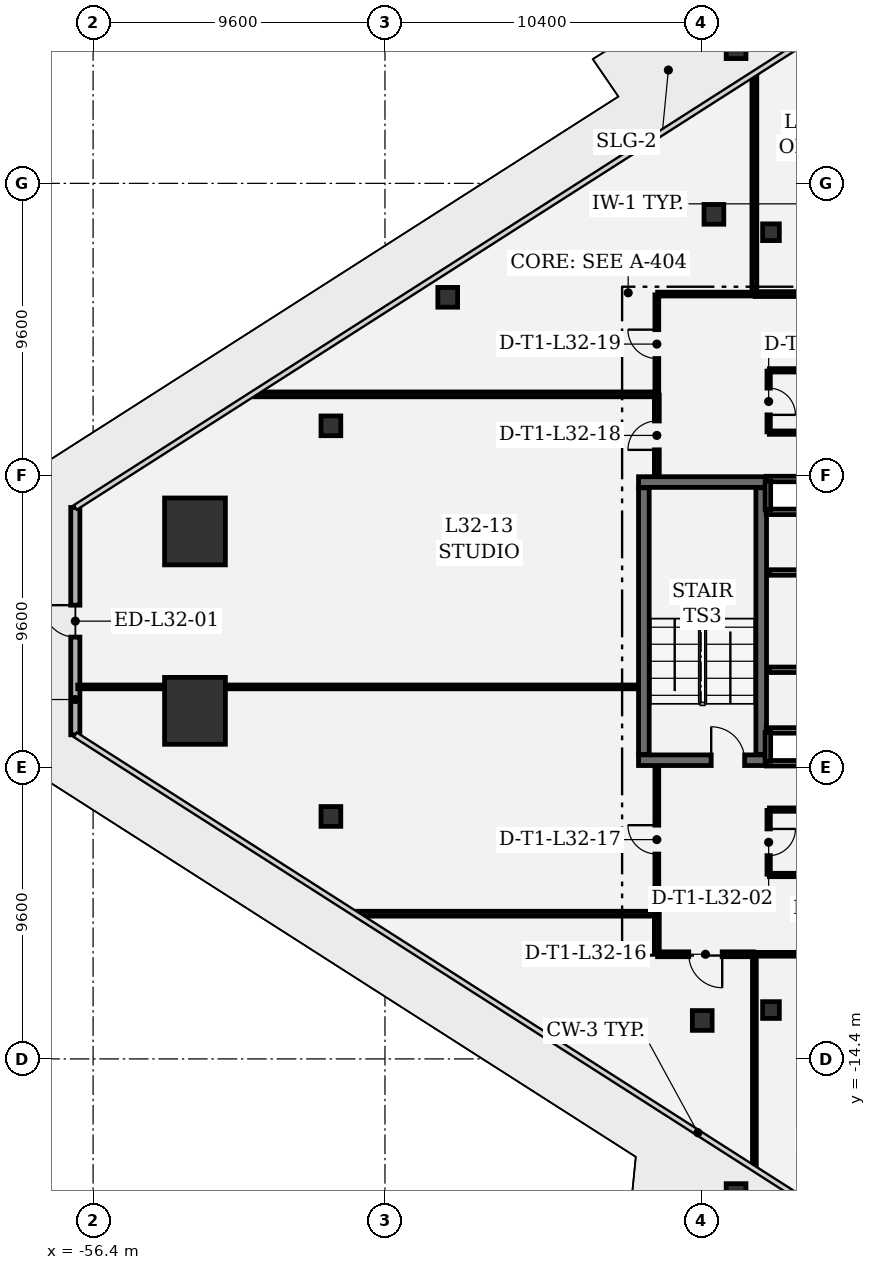
"""IFC4 building model, lengths in metres.
Left out: names, types, materials, properties, quantities, classifications, styles, units other than length and angle.
Written with IfcOpenShell. Run it as: python <this file> out.ifc"""

import sys

from ifc_helpers import new_model, si_unit, direction, frame, frame_2d, origin, origin_2d, place, context, subcontext, project, spatial, rectangle, extrude, element, fill, save


model = new_model("IFC4")
c1 = context("Model", 3, precision=1e-05, world=origin(), true_north=direction((0.0, 1.0)))
c2 = subcontext(c1, "Body", "Model", "MODEL_VIEW")
j1 = project(units=[si_unit("LENGTHUNIT", "METRE"), si_unit("PLANEANGLEUNIT", "RADIAN")], contexts=[c1])
p1 = place(None, origin())
s1 = spatial("IfcSite", under=j1, at=p1, CompositionType="ELEMENT")
p2 = place(p1, origin())
s2 = spatial("IfcBuilding", under=s1, at=p2, CompositionType="ELEMENT")
p3 = place(p2, frame((0.0, 0.0, 142.2)))
s3 = spatial("IfcBuildingStorey", under=s2, at=p3, CompositionType="ELEMENT", Elevation=142.2)
for number, where, z_axis, x_axis in (
    (1, (-53.049, 2.951, 0.0), (0.0, 0.0, 1.0), (1.0, 0.0, 0.0)),
    (2, (-53.049, -2.951, 0.0), (0.0, 0.0, 1.0), (1.0, 0.0, 0.0)),
):
    element("IfcColumn", number, at=place(p3, frame(where, z_axis=z_axis, x_axis=x_axis)), inside=s3, PredefinedType="COLUMN", context=c2, shape_type="SweptSolid", body=[
        extrude(rectangle(XDim=2.0, YDim=2.2, at=origin_2d()), origin(), (0.0, 0.0, 1.0), 4.05),
    ])
for number, where, z_axis, x_axis in (
    (3, (-35.252, 18.829, 0.0), (0.0, 0.0, 1.0), (1.0, 0.0, 0.0)),
    (4, (-35.252, -18.829, 0.0), (0.0, 0.0, 1.0), (1.0, 0.0, 0.0)),
    (5, (-44.736, 10.652, 0.0), (0.0, 0.0, 1.0), (1.0, 0.0, 0.0)),
    (6, (-48.578, 6.425, 0.0), (0.0, 0.0, 1.0), (1.0, 0.0, 0.0)),
    (7, (-48.578, -6.425, 0.0), (0.0, 0.0, 1.0), (1.0, 0.0, 0.0)),
    (8, (-35.981, 13.381, 0.0), (0.0, 0.0, 1.0), (1.0, 0.0, 0.0)),
    (9, (-36.365, -13.135, 0.0), (0.0, 0.0, 1.0), (1.0, 0.0, 0.0)),
):
    element("IfcColumn", number, at=place(p3, frame(where, z_axis=z_axis, x_axis=x_axis)), inside=s3, PredefinedType="COLUMN", context=c2, shape_type="SweptSolid", body=[
        extrude(rectangle(XDim=0.65, YDim=0.65, at=origin_2d()), origin(), (0.0, 0.0, 1.0), 4.05),
    ])
for number, where, z_axis, x_axis in (
    (10, (-34.104, 12.792, 0.0), (0.0, 0.0, 1.0), (1.0, 0.0, 0.0)),
    (11, (-34.104, -12.792, 0.0), (0.0, 0.0, 1.0), (1.0, 0.0, 0.0)),
):
    element("IfcColumn", number, at=place(p3, frame(where, z_axis=z_axis, x_axis=x_axis)), inside=s3, PredefinedType="COLUMN", context=c2, shape_type="SweptSolid", body=[
        extrude(rectangle(XDim=0.55, YDim=0.55, at=origin_2d()), origin(), (0.0, 0.0, 1.0), 4.05),
    ])
p4 = place(p3, frame((-56.985, -3.74, 0.0), z_axis=(0.0, 0.0, 1.0), x_axis=(0.0, 1.0, 0.0)))
e12 = element("IfcWall", 12, at=p4, inside=s3, PredefinedType="SOLIDWALL", context=c2, shape_type="SweptSolid", body=[
    extrude(rectangle(XDim=7.479, YDim=0.3, at=frame_2d((3.74, 0.0))), origin(), (0.0, 0.0, 1.0), 3.78),
])
p5 = place(p4, frame((3.215, 0.0, 0.0)))
e13 = element("IfcOpeningElement", 13, at=p5, cuts=e12, PredefinedType="OPENING", context=c2, shape_type="SweptSolid", body=[
    extrude(rectangle(XDim=1.05, YDim=2.2, at=frame_2d((0.525, 1.1))), frame((0.0, 0.16, 0.0), z_axis=(0.0, -1.0, 0.0), x_axis=(1.0, 0.0, 0.0)), (0.0, 0.0, 1.0), 0.32),
])
p6 = place(p3, frame((-38.46, -4.575, 0.0), z_axis=(0.0, 0.0, 1.0), x_axis=(1.0, 0.0, 0.0)))
e14 = element("IfcWall", 14, at=p6, inside=s3, PredefinedType="SHEAR", context=c2, shape_type="SweptSolid", body=[
    extrude(rectangle(XDim=4.21, YDim=0.35, at=frame_2d((2.105, 0.0))), origin(), (0.0, 0.0, 1.0), 3.78),
])
p7 = place(p6, frame((2.39, 0.0, 0.0)))
e15 = element("IfcOpeningElement", 15, at=p7, cuts=e14, PredefinedType="OPENING", context=c2, shape_type="SweptSolid", body=[
    extrude(rectangle(XDim=1.1, YDim=2.2, at=frame_2d((0.55, 1.1))), frame((0.0, 0.185, 0.0), z_axis=(0.0, -1.0, 0.0), x_axis=(1.0, 0.0, 0.0)), (0.0, 0.0, 1.0), 0.37),
])
p8 = place(p3, frame((-34.25, 4.575, 0.0), z_axis=(0.0, 0.0, 1.0), x_axis=(-1.0, 0.0, 0.0)))
e16 = element("IfcWall", 16, at=p8, inside=s3, PredefinedType="SHEAR", context=c2, shape_type="SweptSolid", body=[
    extrude(rectangle(XDim=4.21, YDim=0.35, at=frame_2d((2.105, 0.0))), origin(), (0.0, 0.0, 1.0), 3.78),
])
for number, where, z_axis, x_axis in (
    (17, (-34.425, -4.385, 0.0), (0.0, 0.0, 1.0), (0.0, 1.0, 0.0)),
    (18, (-38.285, 4.385, 0.0), (0.0, 0.0, 1.0), (0.0, -1.0, 0.0)),
):
    element("IfcWall", number, at=place(p3, frame(where, z_axis=z_axis, x_axis=x_axis)), inside=s3, PredefinedType="SHEAR", context=c2, shape_type="SweptSolid", body=[
        extrude(rectangle(XDim=8.77, YDim=0.35, at=frame_2d((4.385, 0.0))), origin(), (0.0, 0.0, 1.0), 3.78),
    ])
for number, where, z_axis, x_axis in (
    (19, (-32.99, 3.595, 0.0), (0.0, 0.0, 1.0), (-1.0, 0.0, 0.0)),
    (20, (-34.26, 4.675, 0.0), (0.0, 0.0, 1.0), (1.0, 0.0, 0.0)),
):
    element("IfcWall", number, at=place(p3, frame(where, z_axis=z_axis, x_axis=x_axis)), inside=s3, PredefinedType="PARTITIONING", context=c2, shape_type="SweptSolid", body=[
        extrude(rectangle(XDim=1.27, YDim=0.18, at=frame_2d((0.635, 0.0))), origin(), (0.0, 0.0, 1.0), 3.78),
    ])
p9 = place(p3, frame((-34.205, 3.66, 0.0), z_axis=(0.0, 0.0, 1.0), x_axis=(0.0, 1.0, 0.0)))
e21 = element("IfcWall", 21, at=p9, inside=s3, PredefinedType="PARTITIONING", context=c2, shape_type="SweptSolid", body=[
    extrude(rectangle(XDim=0.95, YDim=0.18, at=frame_2d((0.475, 0.0))), origin(), (0.0, 0.0, 1.0), 3.78),
])
for number, where, z_axis, x_axis in (
    (22, (-32.99, -4.675, 0.0), (0.0, 0.0, 1.0), (-1.0, 0.0, 0.0)),
    (23, (-34.26, -3.595, 0.0), (0.0, 0.0, 1.0), (1.0, 0.0, 0.0)),
):
    element("IfcWall", number, at=place(p3, frame(where, z_axis=z_axis, x_axis=x_axis)), inside=s3, PredefinedType="PARTITIONING", context=c2, shape_type="SweptSolid", body=[
        extrude(rectangle(XDim=1.27, YDim=0.18, at=frame_2d((0.635, 0.0))), origin(), (0.0, 0.0, 1.0), 3.78),
    ])
p10 = place(p3, frame((-34.205, -4.61, 0.0), z_axis=(0.0, 0.0, 1.0), x_axis=(0.0, 1.0, 0.0)))
e24 = element("IfcWall", 24, at=p10, inside=s3, PredefinedType="PARTITIONING", context=c2, shape_type="SweptSolid", body=[
    extrude(rectangle(XDim=0.95, YDim=0.18, at=frame_2d((0.475, 0.0))), origin(), (0.0, 0.0, 1.0), 3.78),
])
p11 = place(p3, frame((-34.18, 8.225, 0.0), z_axis=(0.0, 0.0, 1.0), x_axis=(0.0, -1.0, 0.0)))
e25 = element("IfcWall", 25, at=p11, inside=s3, PredefinedType="PARTITIONING", context=c2, shape_type="SweptSolid", body=[
    extrude(rectangle(XDim=2.0, YDim=0.11, at=frame_2d((1.0, 0.0))), origin(), (0.0, 0.0, 1.0), 3.78),
])
p12 = place(p11, frame((0.56, 0.0, 0.0)))
e26 = element("IfcOpeningElement", 26, at=p12, cuts=e25, PredefinedType="OPENING", context=c2, shape_type="SweptSolid", body=[
    extrude(rectangle(XDim=0.88, YDim=2.1, at=frame_2d((0.44, 1.05))), frame((0.0, 0.065, 0.0), z_axis=(0.0, -1.0, 0.0), x_axis=(1.0, 0.0, 0.0)), (0.0, 0.0, 1.0), 0.13),
])
p13 = place(p3, frame((-34.155, 6.2, 0.0), z_axis=(0.0, 0.0, 1.0), x_axis=(1.0, 0.0, 0.0)))
e27 = element("IfcWall", 27, at=p13, inside=s3, PredefinedType="PARTITIONING", context=c2, shape_type="SweptSolid", body=[
    extrude(rectangle(XDim=3.25, YDim=0.11, at=frame_2d((1.625, 0.0))), origin(), (0.0, 0.0, 1.0), 3.344),
])
p14 = place(p3, frame((-30.905, 8.25, 0.0), z_axis=(0.0, 0.0, 1.0), x_axis=(-1.0, 0.0, 0.0)))
e28 = element("IfcWall", 28, at=p14, inside=s3, PredefinedType="PARTITIONING", context=c2, shape_type="SweptSolid", body=[
    extrude(rectangle(XDim=3.25, YDim=0.11, at=frame_2d((1.625, 0.0))), origin(), (0.0, 0.0, 1.0), 3.78),
])
p15 = place(p3, frame((-34.18, -6.225, 0.0), z_axis=(0.0, 0.0, 1.0), x_axis=(0.0, -1.0, 0.0)))
e29 = element("IfcWall", 29, at=p15, inside=s3, PredefinedType="PARTITIONING", context=c2, shape_type="SweptSolid", body=[
    extrude(rectangle(XDim=2.1, YDim=0.11, at=frame_2d((1.05, 0.0))), origin(), (0.0, 0.0, 1.0), 3.78),
])
p16 = place(p15, frame((0.61, 0.0, 0.0)))
e30 = element("IfcOpeningElement", 30, at=p16, cuts=e29, PredefinedType="OPENING", context=c2, shape_type="SweptSolid", body=[
    extrude(rectangle(XDim=0.88, YDim=2.1, at=frame_2d((0.44, 1.05))), frame((0.0, 0.065, 0.0), z_axis=(0.0, -1.0, 0.0), x_axis=(1.0, 0.0, 0.0)), (0.0, 0.0, 1.0), 0.13),
])
p17 = place(p3, frame((-34.155, -8.35, 0.0), z_axis=(0.0, 0.0, 1.0), x_axis=(1.0, 0.0, 0.0)))
e31 = element("IfcWall", 31, at=p17, inside=s3, PredefinedType="PARTITIONING", context=c2, shape_type="SweptSolid", body=[
    extrude(rectangle(XDim=3.25, YDim=0.11, at=frame_2d((1.625, 0.0))), origin(), (0.0, 0.0, 1.0), 3.78),
])
p18 = place(p3, frame((-30.905, -6.2, 0.0), z_axis=(0.0, 0.0, 1.0), x_axis=(-1.0, 0.0, 0.0)))
e32 = element("IfcWall", 32, at=p18, inside=s3, PredefinedType="PARTITIONING", context=c2, shape_type="SweptSolid", body=[
    extrude(rectangle(XDim=3.25, YDim=0.11, at=frame_2d((1.625, 0.0))), origin(), (0.0, 0.0, 1.0), 3.344),
])
p19 = place(p3, frame((-34.155, 1.6, 0.0), z_axis=(0.0, 0.0, 1.0), x_axis=(1.0, 0.0, 0.0)))
e33 = element("IfcWall", 33, at=p19, inside=s3, PredefinedType="PARTITIONING", context=c2, shape_type="SweptSolid", body=[
    extrude(rectangle(XDim=3.25, YDim=0.18, at=frame_2d((1.625, 0.0))), origin(), (0.0, 0.0, 1.0), 3.78),
])
p20 = place(p19, frame((1.185, 0.0, 0.0)))
e34 = element("IfcOpeningElement", 34, at=p20, cuts=e33, PredefinedType="OPENING", context=c2, shape_type="SweptSolid", body=[
    extrude(rectangle(XDim=0.88, YDim=2.1, at=frame_2d((0.44, 1.05))), frame((0.0, 0.1, 0.0), z_axis=(0.0, -1.0, 0.0), x_axis=(1.0, 0.0, 0.0)), (0.0, 0.0, 1.0), 0.2),
])
p21 = place(p3, frame((-30.905, -1.6, 0.0), z_axis=(0.0, 0.0, 1.0), x_axis=(-1.0, 0.0, 0.0)))
e35 = element("IfcWall", 35, at=p21, inside=s3, PredefinedType="PARTITIONING", context=c2, shape_type="SweptSolid", body=[
    extrude(rectangle(XDim=3.25, YDim=0.18, at=frame_2d((1.625, 0.0))), origin(), (0.0, 0.0, 1.0), 3.78),
])
p22 = place(p21, frame((1.185, 0.0, 0.0)))
e36 = element("IfcOpeningElement", 36, at=p22, cuts=e35, PredefinedType="OPENING", context=c2, shape_type="SweptSolid", body=[
    extrude(rectangle(XDim=0.88, YDim=2.1, at=frame_2d((0.44, 1.05))), frame((0.0, 0.1, 0.0), z_axis=(0.0, -1.0, 0.0), x_axis=(1.0, 0.0, 0.0)), (0.0, 0.0, 1.0), 0.2),
])
p23 = place(p3, frame((-34.625, 10.758, 0.0), z_axis=(0.0, 0.0, 1.0), x_axis=(1.0, 0.0, 0.0)))
e37 = element("IfcWall", 37, at=p23, inside=s3, PredefinedType="PARTITIONING", context=c2, shape_type="SweptSolid", body=[
    extrude(rectangle(XDim=4.621, YDim=0.16, at=frame_2d((2.311, 0.0))), origin(), (0.0, 0.0, 1.0), 3.344),
])
p24 = place(p23, frame((1.76, 0.0, 0.0)))
e38 = element("IfcOpeningElement", 38, at=p24, cuts=e37, PredefinedType="OPENING", context=c2, shape_type="SweptSolid", body=[
    extrude(rectangle(XDim=1.1, YDim=2.15, at=frame_2d((0.55, 1.075))), frame((0.0, 0.09, 0.0), z_axis=(0.0, -1.0, 0.0), x_axis=(1.0, 0.0, 0.0)), (0.0, 0.0, 1.0), 0.18),
])
p25 = place(p3, frame((-34.65, 17.935, 0.0), z_axis=(0.0, 0.0, 1.0), x_axis=(0.0, -1.0, 0.0)))
e39 = element("IfcWall", 39, at=p25, inside=s3, PredefinedType="PARTITIONING", context=c2, shape_type="SweptSolid", body=[
    extrude(rectangle(XDim=7.151, YDim=0.16, at=frame_2d((3.576, 0.0))), origin(), (0.0, 0.0, 1.0), 3.78),
])
p26 = place(p3, frame((-28.127, -10.958, 0.0), z_axis=(0.0, 0.0, 1.0), x_axis=(-1.0, 0.0, 0.0)))
e40 = element("IfcWall", 40, at=p26, inside=s3, PredefinedType="PARTITIONING", context=c2, shape_type="SweptSolid", body=[
    extrude(rectangle(XDim=6.498, YDim=0.125, at=frame_2d((3.249, 0.0))), origin(), (0.0, 0.0, 1.0), 3.78),
])
p27 = place(p26, frame((2.774, 0.0, 0.0)))
e41 = element("IfcOpeningElement", 41, at=p27, cuts=e40, PredefinedType="OPENING", context=c2, shape_type="SweptSolid", body=[
    extrude(rectangle(XDim=0.95, YDim=2.15, at=frame_2d((0.475, 1.075))), frame((0.0, 0.073, 0.0), z_axis=(0.0, -1.0, 0.0), x_axis=(1.0, 0.0, 0.0)), (0.0, 0.0, 1.0), 0.145),
])
p28 = place(p3, frame((-34.65, -10.983, 0.0), z_axis=(0.0, 0.0, 1.0), x_axis=(0.0, -1.0, 0.0)))
e42 = element("IfcWall", 42, at=p28, inside=s3, PredefinedType="PARTITIONING", context=c2, shape_type="SweptSolid", body=[
    extrude(rectangle(XDim=6.952, YDim=0.125, at=frame_2d((3.476, 0.0))), origin(), (0.0, 0.0, 1.0), 3.78),
])
p29 = place(p3, frame((-34.683, -10.958, 0.0), z_axis=(0.0, 0.0, 1.0), x_axis=(-1.0, 0.0, 0.0)))
e43 = element("IfcWall", 43, at=p29, inside=s3, PredefinedType="PARTITIONING", context=c2, shape_type="SweptSolid", body=[
    extrude(rectangle(XDim=3.15, YDim=0.16, at=frame_2d((1.575, 0.0))), origin(), (0.0, 0.0, 1.0), 3.344),
])
p30 = place(p29, frame((1.025, 0.0, 0.0)))
e44 = element("IfcOpeningElement", 44, at=p30, cuts=e43, PredefinedType="OPENING", context=c2, shape_type="SweptSolid", body=[
    extrude(rectangle(XDim=1.1, YDim=2.15, at=frame_2d((0.55, 1.075))), frame((0.0, 0.09, 0.0), z_axis=(0.0, -1.0, 0.0), x_axis=(1.0, 0.0, 0.0)), (0.0, 0.0, 1.0), 0.18),
])
p31 = place(p3, frame((-37.858, -10.933, 0.0), z_axis=(0.0, 0.0, 1.0), x_axis=(0.0, 1.0, 0.0)))
e45 = element("IfcWall", 45, at=p31, inside=s3, PredefinedType="PARTITIONING", context=c2, shape_type="SweptSolid", body=[
    extrude(rectangle(XDim=1.285, YDim=0.16, at=frame_2d((0.642, 0.0))), origin(), (0.0, 0.0, 1.0), 3.78),
])
p32 = place(p3, frame((-37.883, -9.624, 0.0), z_axis=(0.0, 0.0, 1.0), x_axis=(-1.0, 0.0, 0.0)))
e46 = element("IfcWall", 46, at=p32, inside=s3, PredefinedType="PARTITIONING", context=c2, shape_type="SweptSolid", body=[
    extrude(rectangle(XDim=9.816, YDim=0.16, at=frame_2d((4.908, 0.0))), origin(), (0.0, 0.0, 1.0), 2.9),
])
p33 = place(p3, frame((-37.858, -9.591, 0.0), z_axis=(0.0, 0.0, 1.0), x_axis=(0.0, 1.0, 0.0)))
e47 = element("IfcWall", 47, at=p33, inside=s3, PredefinedType="PARTITIONING", context=c2, shape_type="SweptSolid", body=[
    extrude(rectangle(XDim=4.807, YDim=0.125, at=frame_2d((2.404, 0.0))), origin(), (0.0, 0.0, 1.0), 3.78),
])
p34 = place(p33, frame((1.929, 0.0, 0.0)))
e48 = element("IfcOpeningElement", 48, at=p34, cuts=e47, PredefinedType="OPENING", context=c2, shape_type="SweptSolid", body=[
    extrude(rectangle(XDim=0.95, YDim=2.15, at=frame_2d((0.475, 1.075))), frame((0.0, 0.073, 0.0), z_axis=(0.0, -1.0, 0.0), x_axis=(1.0, 0.0, 0.0)), (0.0, 0.0, 1.0), 0.145),
])
p35 = place(p3, frame((-38.493, -2.164, 0.0), z_axis=(0.0, 0.0, 1.0), x_axis=(-1.0, 0.0, 0.0)))
e49 = element("IfcWall", 49, at=p35, inside=s3, PredefinedType="PARTITIONING", context=c2, shape_type="SweptSolid", body=[
    extrude(rectangle(XDim=13.491, YDim=0.125, at=frame_2d((6.746, 0.0))), origin(), (0.0, 0.0, 1.0), 3.78),
])
p36 = place(p3, frame((-54.115, -2.164, 0.0), z_axis=(0.0, 0.0, 1.0), x_axis=(-1.0, 0.0, 0.0)))
e50 = element("IfcWall", 50, at=p36, inside=s3, PredefinedType="PARTITIONING", context=c2, shape_type="SweptSolid", body=[
    extrude(rectangle(XDim=2.791, YDim=0.125, at=frame_2d((1.395, 0.0))), origin(), (0.0, 0.0, 1.0), 3.78),
])
p37 = place(p3, frame((-37.858, 4.783, 0.0), z_axis=(0.0, 0.0, 1.0), x_axis=(0.0, 1.0, 0.0)))
e51 = element("IfcWall", 51, at=p37, inside=s3, PredefinedType="PARTITIONING", context=c2, shape_type="SweptSolid", body=[
    extrude(rectangle(XDim=2.651, YDim=0.16, at=frame_2d((1.326, 0.0))), origin(), (0.0, 0.0, 1.0), 3.78),
])
p38 = place(p37, frame((0.851, 0.0, 0.0)))
e52 = element("IfcOpeningElement", 52, at=p38, cuts=e51, PredefinedType="OPENING", context=c2, shape_type="SweptSolid", body=[
    extrude(rectangle(XDim=0.95, YDim=2.15, at=frame_2d((0.475, 1.075))), frame((0.0, 0.09, 0.0), z_axis=(0.0, -1.0, 0.0), x_axis=(1.0, 0.0, 0.0)), (0.0, 0.0, 1.0), 0.18),
])
p39 = place(p3, frame((-37.883, 7.459, 0.0), z_axis=(0.0, 0.0, 1.0), x_axis=(-1.0, 0.0, 0.0)))
e53 = element("IfcWall", 53, at=p39, inside=s3, PredefinedType="PARTITIONING", context=c2, shape_type="SweptSolid", body=[
    extrude(rectangle(XDim=13.202, YDim=0.16, at=frame_2d((6.601, 0.0))), origin(), (0.0, 0.0, 1.0), 2.9),
])
p40 = place(p3, frame((-37.858, 7.492, 0.0), z_axis=(0.0, 0.0, 1.0), x_axis=(0.0, 1.0, 0.0)))
e54 = element("IfcWall", 54, at=p40, inside=s3, PredefinedType="PARTITIONING", context=c2, shape_type="SweptSolid", body=[
    extrude(rectangle(XDim=3.241, YDim=0.125, at=frame_2d((1.62, 0.0))), origin(), (0.0, 0.0, 1.0), 3.78),
])
p41 = place(p40, frame((1.146, 0.0, 0.0)))
e55 = element("IfcOpeningElement", 55, at=p41, cuts=e54, PredefinedType="OPENING", context=c2, shape_type="SweptSolid", body=[
    extrude(rectangle(XDim=0.95, YDim=2.15, at=frame_2d((0.475, 1.075))), frame((0.0, 0.073, 0.0), z_axis=(0.0, -1.0, 0.0), x_axis=(1.0, 0.0, 0.0)), (0.0, 0.0, 1.0), 0.145),
])
p42 = place(p3, frame((-37.833, 10.758, 0.0), z_axis=(0.0, 0.0, 1.0), x_axis=(1.0, 0.0, 0.0)))
e56 = element("IfcWall", 56, at=p42, inside=s3, PredefinedType="PARTITIONING", context=c2, shape_type="SweptSolid", body=[
    extrude(rectangle(XDim=3.15, YDim=0.125, at=frame_2d((1.575, 0.0))), origin(), (0.0, 0.0, 1.0), 3.344),
])
p43 = place(p5, origin())
e57 = element("IfcDoor", 57, at=p43, inside=s3, OperationType="SINGLE_SWING_RIGHT", PredefinedType="DOOR", context=c2, shape_type="SweptSolid", body=[
    extrude(rectangle(XDim=1.05, YDim=2.2, at=frame_2d((0.525, 1.1))), frame((0.0, 0.025, 0.0), z_axis=(0.0, -1.0, 0.0), x_axis=(1.0, 0.0, 0.0)), (0.0, 0.0, 1.0), 0.05),
])
fill(e13, e57)
p44 = place(p7, origin())
e58 = element("IfcDoor", 58, at=p44, inside=s3, OperationType="SINGLE_SWING_LEFT", PredefinedType="DOOR", context=c2, shape_type="SweptSolid", body=[
    extrude(rectangle(XDim=1.1, YDim=2.2, at=frame_2d((0.55, 1.1))), frame((0.0, 0.025, 0.0), z_axis=(0.0, -1.0, 0.0), x_axis=(1.0, 0.0, 0.0)), (0.0, 0.0, 1.0), 0.05),
])
fill(e15, e58)
p45 = place(p12, origin())
e59 = element("IfcDoor", 59, at=p45, inside=s3, OperationType="SINGLE_SWING_RIGHT", PredefinedType="DOOR", context=c2, shape_type="SweptSolid", body=[
    extrude(rectangle(XDim=0.88, YDim=2.1, at=frame_2d((0.44, 1.05))), frame((0.0, 0.025, 0.0), z_axis=(0.0, -1.0, 0.0), x_axis=(1.0, 0.0, 0.0)), (0.0, 0.0, 1.0), 0.05),
])
fill(e26, e59)
p46 = place(p16, origin())
e60 = element("IfcDoor", 60, at=p46, inside=s3, OperationType="SINGLE_SWING_LEFT", PredefinedType="DOOR", context=c2, shape_type="SweptSolid", body=[
    extrude(rectangle(XDim=0.88, YDim=2.1, at=frame_2d((0.44, 1.05))), frame((0.0, 0.025, 0.0), z_axis=(0.0, -1.0, 0.0), x_axis=(1.0, 0.0, 0.0)), (0.0, 0.0, 1.0), 0.05),
])
fill(e30, e60)
p47 = place(p30, origin())
e61 = element("IfcDoor", 61, at=p47, inside=s3, OperationType="SINGLE_SWING_LEFT", PredefinedType="DOOR", context=c2, shape_type="SweptSolid", body=[
    extrude(rectangle(XDim=1.1, YDim=2.15, at=frame_2d((0.55, 1.075))), frame((0.0, 0.025, 0.0), z_axis=(0.0, -1.0, 0.0), x_axis=(1.0, 0.0, 0.0)), (0.0, 0.0, 1.0), 0.05),
])
fill(e44, e61)
p48 = place(p34, origin())
e62 = element("IfcDoor", 62, at=p48, inside=s3, OperationType="SINGLE_SWING_RIGHT", PredefinedType="DOOR", context=c2, shape_type="SweptSolid", body=[
    extrude(rectangle(XDim=0.95, YDim=2.15, at=frame_2d((0.475, 1.075))), frame((0.0, 0.025, 0.0), z_axis=(0.0, -1.0, 0.0), x_axis=(1.0, 0.0, 0.0)), (0.0, 0.0, 1.0), 0.05),
])
fill(e48, e62)
p49 = place(p38, origin())
e63 = element("IfcDoor", 63, at=p49, inside=s3, OperationType="SINGLE_SWING_LEFT", PredefinedType="DOOR", context=c2, shape_type="SweptSolid", body=[
    extrude(rectangle(XDim=0.95, YDim=2.15, at=frame_2d((0.475, 1.075))), frame((0.0, 0.025, 0.0), z_axis=(0.0, -1.0, 0.0), x_axis=(1.0, 0.0, 0.0)), (0.0, 0.0, 1.0), 0.05),
])
fill(e52, e63)
p50 = place(p41, origin())
e64 = element("IfcDoor", 64, at=p50, inside=s3, OperationType="SINGLE_SWING_RIGHT", PredefinedType="DOOR", context=c2, shape_type="SweptSolid", body=[
    extrude(rectangle(XDim=0.95, YDim=2.15, at=frame_2d((0.475, 1.075))), frame((0.0, 0.025, 0.0), z_axis=(0.0, -1.0, 0.0), x_axis=(1.0, 0.0, 0.0)), (0.0, 0.0, 1.0), 0.05),
])
fill(e55, e64)
save(model, sys.argv[1])
